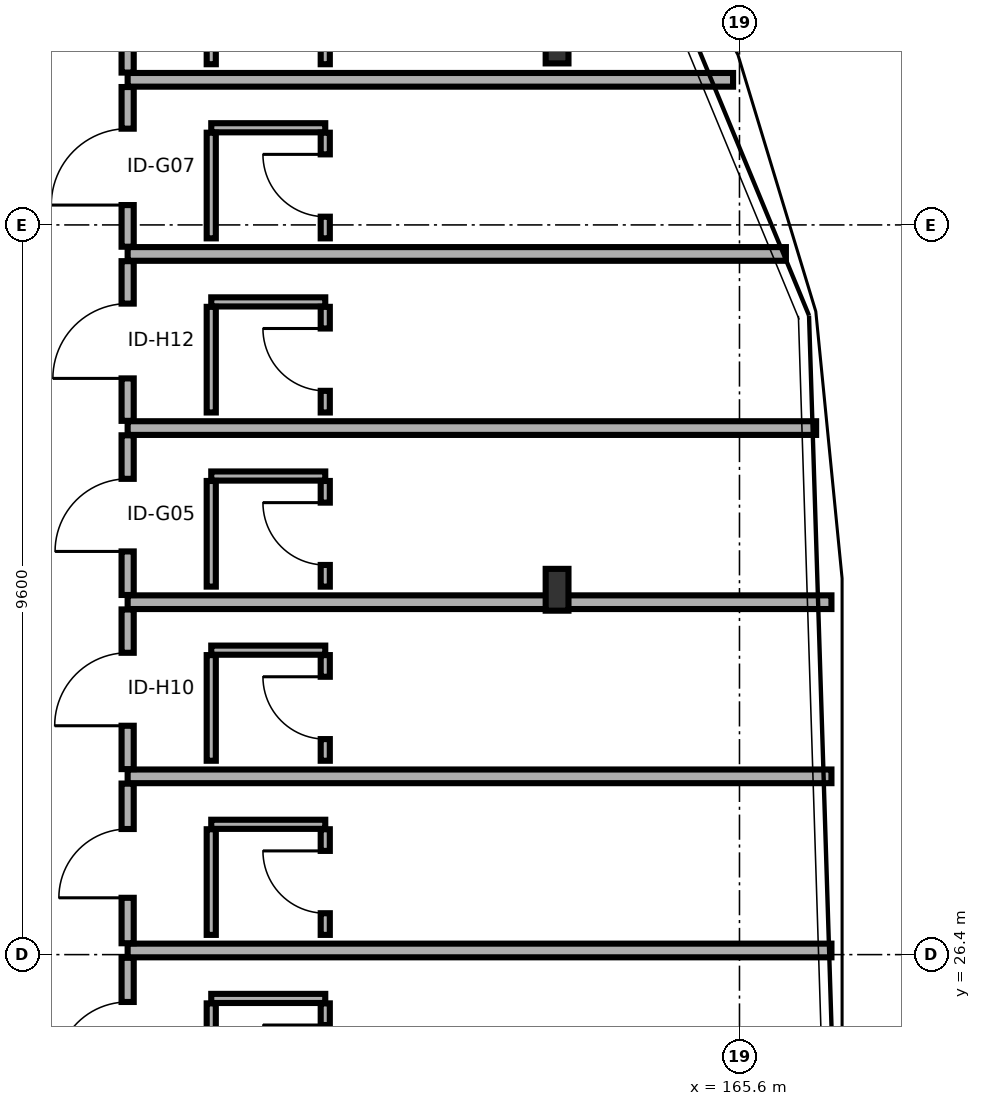
"""IFC4 building model, lengths in metres.
Left out: names, types, materials, properties, quantities, classifications, styles, units other than length and angle.
Written with IfcOpenShell. Run it as: python <this file> out.ifc"""

import sys

from ifc_helpers import new_model, si_unit, direction, frame, frame_2d, origin, origin_2d, place, context, subcontext, project, spatial, rectangle, i_section, extrude, element, fill, save


model = new_model("IFC4")
c1 = context("Model", 3, precision=1e-05, world=origin(), true_north=direction((0.0, 1.0)))
c2 = subcontext(c1, "Body", "Model", "MODEL_VIEW")
j1 = project(units=[si_unit("LENGTHUNIT", "METRE"), si_unit("PLANEANGLEUNIT", "RADIAN")], contexts=[c1])
p1 = place(None, origin())
s1 = spatial("IfcSite", under=j1, at=p1, CompositionType="ELEMENT")
p2 = place(p1, origin())
s2 = spatial("IfcBuilding", under=s1, at=p2, CompositionType="ELEMENT")
p3 = place(p2, frame((0.0, 0.0, 21.5)))
s3 = spatial("IfcBuildingStorey", under=s2, at=p3, CompositionType="ELEMENT", Elevation=21.5)
for number, where, z_axis, x_axis in (
    (1, (163.2, 31.2, 0.0), (0.0, 0.0, 1.0), (1.0, 0.0, 0.0)),
    (2, (163.2, 38.4, 0.0), (0.0, 0.0, 1.0), (1.0, 0.0, 0.0)),
):
    element("IfcColumn", number, at=place(p3, frame(where, z_axis=z_axis, x_axis=x_axis)), inside=s3, PredefinedType="COLUMN", context=c2, shape_type="SweptSolid", body=[
        extrude(i_section(OverallWidth=0.3, OverallDepth=0.55, WebThickness=0.015, FlangeThickness=0.029, FilletRadius=0.027, at=origin_2d()), origin(), (0.0, 0.0, 1.0), 3.4),
    ])
p4 = place(p3, frame((157.55, 24.259, 0.0), z_axis=(0.0, 0.0, 1.0), x_axis=(0.0, 1.0, 0.0)))
e3 = element("IfcWall", 3, at=p4, inside=s3, PredefinedType="PARTITIONING", context=c2, shape_type="SweptSolid", body=[
    extrude(rectangle(XDim=2.101, YDim=0.16, at=frame_2d((1.051, 0.0))), origin(), (0.0, 0.0, 1.0), 3.195),
])
p5 = place(p4, frame((0.583, 0.0, 0.0)))
e4 = element("IfcOpeningElement", 4, at=p5, cuts=e3, PredefinedType="OPENING", context=c2, shape_type="SweptSolid", body=[
    extrude(rectangle(XDim=0.936, YDim=2.07, at=frame_2d((0.468, 1.035))), frame((0.0, 0.09, 0.0), z_axis=(0.0, -1.0, 0.0), x_axis=(1.0, 0.0, 0.0)), (0.0, 0.0, 1.0), 0.18),
])
p6 = place(p3, frame((158.65, 25.823, 0.0), z_axis=(0.0, 0.0, 1.0), x_axis=(1.0, 0.0, 0.0)))
e5 = element("IfcWall", 5, at=p6, inside=s3, PredefinedType="PARTITIONING", context=c2, shape_type="SweptSolid", body=[
    extrude(rectangle(XDim=1.5, YDim=0.12, at=frame_2d((0.75, 0.0))), origin(), (0.0, 0.0, 1.0), 3.195),
])
p7 = place(p3, frame((158.65, 24.369, 0.0), z_axis=(0.0, 0.0, 1.0), x_axis=(0.0, 1.0, 0.0)))
e6 = element("IfcWall", 6, at=p7, inside=s3, PredefinedType="PARTITIONING", context=c2, shape_type="SweptSolid", body=[
    extrude(rectangle(XDim=1.39, YDim=0.12, at=frame_2d((0.695, 0.0))), origin(), (0.0, 0.0, 1.0), 3.195),
])
p8 = place(p3, frame((160.15, 24.369, 0.0), z_axis=(0.0, 0.0, 1.0), x_axis=(0.0, 1.0, 0.0)))
e7 = element("IfcWall", 7, at=p8, inside=s3, PredefinedType="PARTITIONING", context=c2, shape_type="SweptSolid", body=[
    extrude(rectangle(XDim=1.39, YDim=0.12, at=frame_2d((0.695, 0.0))), origin(), (0.0, 0.0, 1.0), 3.195),
])
p9 = place(p8, frame((0.285, 0.0, 0.0)))
e8 = element("IfcOpeningElement", 8, at=p9, cuts=e7, PredefinedType="OPENING", context=c2, shape_type="SweptSolid", body=[
    extrude(rectangle(XDim=0.82, YDim=2.08, at=frame_2d((0.41, 1.04))), frame((0.0, 0.07, 0.0), z_axis=(0.0, -1.0, 0.0), x_axis=(1.0, 0.0, 0.0)), (0.0, 0.0, 1.0), 0.14),
])
p10 = place(p3, frame((157.55, 26.455, 0.0), z_axis=(0.0, 0.0, 1.0), x_axis=(1.0, 0.0, 0.0)))
e9 = element("IfcWall", 9, at=p10, inside=s3, PredefinedType="PARTITIONING", context=c2, shape_type="SweptSolid", body=[
    extrude(rectangle(XDim=9.26, YDim=0.18, at=frame_2d((4.63, 0.0))), origin(), (0.0, 0.0, 1.0), 2.68),
])
p11 = place(p3, frame((157.55, 26.55, 0.0), z_axis=(0.0, 0.0, 1.0), x_axis=(0.0, 1.0, 0.0)))
e10 = element("IfcWall", 10, at=p11, inside=s3, PredefinedType="PARTITIONING", context=c2, shape_type="SweptSolid", body=[
    extrude(rectangle(XDim=2.101, YDim=0.16, at=frame_2d((1.05, 0.0))), origin(), (0.0, 0.0, 1.0), 3.195),
])
p12 = place(p11, frame((0.598, 0.0, 0.0)))
e11 = element("IfcOpeningElement", 11, at=p12, cuts=e10, PredefinedType="OPENING", context=c2, shape_type="SweptSolid", body=[
    extrude(rectangle(XDim=0.905, YDim=2.05, at=frame_2d((0.453, 1.025))), frame((0.0, 0.09, 0.0), z_axis=(0.0, -1.0, 0.0), x_axis=(1.0, 0.0, 0.0)), (0.0, 0.0, 1.0), 0.18),
])
p13 = place(p3, frame((158.65, 28.115, 0.0), z_axis=(0.0, 0.0, 1.0), x_axis=(1.0, 0.0, 0.0)))
e12 = element("IfcWall", 12, at=p13, inside=s3, PredefinedType="PARTITIONING", context=c2, shape_type="SweptSolid", body=[
    extrude(rectangle(XDim=1.5, YDim=0.12, at=frame_2d((0.75, 0.0))), origin(), (0.0, 0.0, 1.0), 3.195),
])
p14 = place(p3, frame((158.65, 26.659, 0.0), z_axis=(0.0, 0.0, 1.0), x_axis=(0.0, 1.0, 0.0)))
e13 = element("IfcWall", 13, at=p14, inside=s3, PredefinedType="PARTITIONING", context=c2, shape_type="SweptSolid", body=[
    extrude(rectangle(XDim=1.39, YDim=0.12, at=frame_2d((0.695, 0.0))), origin(), (0.0, 0.0, 1.0), 3.195),
])
p15 = place(p3, frame((160.15, 26.659, 0.0), z_axis=(0.0, 0.0, 1.0), x_axis=(0.0, 1.0, 0.0)))
e14 = element("IfcWall", 14, at=p15, inside=s3, PredefinedType="PARTITIONING", context=c2, shape_type="SweptSolid", body=[
    extrude(rectangle(XDim=1.39, YDim=0.12, at=frame_2d((0.695, 0.0))), origin(), (0.0, 0.0, 1.0), 3.195),
])
p16 = place(p15, frame((0.285, 0.0, 0.0)))
e15 = element("IfcOpeningElement", 15, at=p16, cuts=e14, PredefinedType="OPENING", context=c2, shape_type="SweptSolid", body=[
    extrude(rectangle(XDim=0.82, YDim=2.08, at=frame_2d((0.41, 1.04))), frame((0.0, 0.07, 0.0), z_axis=(0.0, -1.0, 0.0), x_axis=(1.0, 0.0, 0.0)), (0.0, 0.0, 1.0), 0.14),
])
p17 = place(p3, frame((157.55, 28.746, 0.0), z_axis=(0.0, 0.0, 1.0), x_axis=(1.0, 0.0, 0.0)))
e16 = element("IfcWall", 16, at=p17, inside=s3, PredefinedType="PARTITIONING", context=c2, shape_type="SweptSolid", body=[
    extrude(rectangle(XDim=9.26, YDim=0.18, at=frame_2d((4.63, 0.0))), origin(), (0.0, 0.0, 1.0), 2.68),
])
p18 = place(p3, frame((157.55, 28.841, 0.0), z_axis=(0.0, 0.0, 1.0), x_axis=(0.0, 1.0, 0.0)))
e17 = element("IfcWall", 17, at=p18, inside=s3, PredefinedType="PARTITIONING", context=c2, shape_type="SweptSolid", body=[
    extrude(rectangle(XDim=2.101, YDim=0.16, at=frame_2d((1.05, 0.0))), origin(), (0.0, 0.0, 1.0), 3.195),
])
p19 = place(p18, frame((0.571, 0.0, 0.0)))
e18 = element("IfcOpeningElement", 18, at=p19, cuts=e17, PredefinedType="OPENING", context=c2, shape_type="SweptSolid", body=[
    extrude(rectangle(XDim=0.96, YDim=2.13, at=frame_2d((0.48, 1.065))), frame((0.0, 0.09, 0.0), z_axis=(0.0, -1.0, 0.0), x_axis=(1.0, 0.0, 0.0)), (0.0, 0.0, 1.0), 0.18),
])
p20 = place(p3, frame((158.65, 30.406, 0.0), z_axis=(0.0, 0.0, 1.0), x_axis=(1.0, 0.0, 0.0)))
e19 = element("IfcWall", 19, at=p20, inside=s3, PredefinedType="PARTITIONING", context=c2, shape_type="SweptSolid", body=[
    extrude(rectangle(XDim=1.5, YDim=0.12, at=frame_2d((0.75, 0.0))), origin(), (0.0, 0.0, 1.0), 3.195),
])
p21 = place(p3, frame((158.65, 28.95, 0.0), z_axis=(0.0, 0.0, 1.0), x_axis=(0.0, 1.0, 0.0)))
e20 = element("IfcWall", 20, at=p21, inside=s3, PredefinedType="PARTITIONING", context=c2, shape_type="SweptSolid", body=[
    extrude(rectangle(XDim=1.39, YDim=0.12, at=frame_2d((0.695, 0.0))), origin(), (0.0, 0.0, 1.0), 3.195),
])
p22 = place(p3, frame((160.15, 28.95, 0.0), z_axis=(0.0, 0.0, 1.0), x_axis=(0.0, 1.0, 0.0)))
e21 = element("IfcWall", 21, at=p22, inside=s3, PredefinedType="PARTITIONING", context=c2, shape_type="SweptSolid", body=[
    extrude(rectangle(XDim=1.39, YDim=0.12, at=frame_2d((0.695, 0.0))), origin(), (0.0, 0.0, 1.0), 3.195),
])
p23 = place(p22, frame((0.285, 0.0, 0.0)))
e22 = element("IfcOpeningElement", 22, at=p23, cuts=e21, PredefinedType="OPENING", context=c2, shape_type="SweptSolid", body=[
    extrude(rectangle(XDim=0.82, YDim=2.08, at=frame_2d((0.41, 1.04))), frame((0.0, 0.07, 0.0), z_axis=(0.0, -1.0, 0.0), x_axis=(1.0, 0.0, 0.0)), (0.0, 0.0, 1.0), 0.14),
])
p24 = place(p3, frame((157.55, 31.036, 0.0), z_axis=(0.0, 0.0, 1.0), x_axis=(1.0, 0.0, 0.0)))
e23 = element("IfcWall", 23, at=p24, inside=s3, PredefinedType="PARTITIONING", context=c2, shape_type="SweptSolid", body=[
    extrude(rectangle(XDim=9.26, YDim=0.18, at=frame_2d((4.63, 0.0))), origin(), (0.0, 0.0, 1.0), 2.68),
])
p25 = place(p3, frame((157.55, 31.131, 0.0), z_axis=(0.0, 0.0, 1.0), x_axis=(0.0, 1.0, 0.0)))
e24 = element("IfcWall", 24, at=p25, inside=s3, PredefinedType="PARTITIONING", context=c2, shape_type="SweptSolid", body=[
    extrude(rectangle(XDim=2.101, YDim=0.16, at=frame_2d((1.051, 0.0))), origin(), (0.0, 0.0, 1.0), 2.73),
])
p26 = place(p25, frame((0.573, 0.0, 0.0)))
e25 = element("IfcOpeningElement", 25, at=p26, cuts=e24, PredefinedType="OPENING", context=c2, shape_type="SweptSolid", body=[
    extrude(rectangle(XDim=0.955, YDim=2.05, at=frame_2d((0.478, 1.025))), frame((0.0, 0.09, 0.0), z_axis=(0.0, -1.0, 0.0), x_axis=(1.0, 0.0, 0.0)), (0.0, 0.0, 1.0), 0.18),
])
p27 = place(p3, frame((158.65, 32.696, 0.0), z_axis=(0.0, 0.0, 1.0), x_axis=(1.0, 0.0, 0.0)))
e26 = element("IfcWall", 26, at=p27, inside=s3, PredefinedType="PARTITIONING", context=c2, shape_type="SweptSolid", body=[
    extrude(rectangle(XDim=1.5, YDim=0.12, at=frame_2d((0.75, 0.0))), origin(), (0.0, 0.0, 1.0), 3.195),
])
p28 = place(p3, frame((158.65, 31.241, 0.0), z_axis=(0.0, 0.0, 1.0), x_axis=(0.0, 1.0, 0.0)))
e27 = element("IfcWall", 27, at=p28, inside=s3, PredefinedType="PARTITIONING", context=c2, shape_type="SweptSolid", body=[
    extrude(rectangle(XDim=1.39, YDim=0.12, at=frame_2d((0.695, 0.0))), origin(), (0.0, 0.0, 1.0), 2.73),
])
p29 = place(p3, frame((160.15, 31.241, 0.0), z_axis=(0.0, 0.0, 1.0), x_axis=(0.0, 1.0, 0.0)))
e28 = element("IfcWall", 28, at=p29, inside=s3, PredefinedType="PARTITIONING", context=c2, shape_type="SweptSolid", body=[
    extrude(rectangle(XDim=1.39, YDim=0.12, at=frame_2d((0.695, 0.0))), origin(), (0.0, 0.0, 1.0), 2.73),
])
p30 = place(p29, frame((0.285, 0.0, 0.0)))
e29 = element("IfcOpeningElement", 29, at=p30, cuts=e28, PredefinedType="OPENING", context=c2, shape_type="SweptSolid", body=[
    extrude(rectangle(XDim=0.82, YDim=2.08, at=frame_2d((0.41, 1.04))), frame((0.0, 0.07, 0.0), z_axis=(0.0, -1.0, 0.0), x_axis=(1.0, 0.0, 0.0)), (0.0, 0.0, 1.0), 0.14),
])
p31 = place(p3, frame((157.55, 33.327, 0.0), z_axis=(0.0, 0.0, 1.0), x_axis=(1.0, 0.0, 0.0)))
e30 = element("IfcWall", 30, at=p31, inside=s3, PredefinedType="PARTITIONING", context=c2, shape_type="SweptSolid", body=[
    extrude(rectangle(XDim=9.058, YDim=0.18, at=frame_2d((4.529, 0.0))), origin(), (0.0, 0.0, 1.0), 2.68),
])
p32 = place(p3, frame((157.55, 33.422, 0.0), z_axis=(0.0, 0.0, 1.0), x_axis=(0.0, 1.0, 0.0)))
e31 = element("IfcWall", 31, at=p32, inside=s3, PredefinedType="PARTITIONING", context=c2, shape_type="SweptSolid", body=[
    extrude(rectangle(XDim=2.101, YDim=0.16, at=frame_2d((1.05, 0.0))), origin(), (0.0, 0.0, 1.0), 3.195),
])
p33 = place(p32, frame((0.559, 0.0, 0.0)))
e32 = element("IfcOpeningElement", 32, at=p33, cuts=e31, PredefinedType="OPENING", context=c2, shape_type="SweptSolid", body=[
    extrude(rectangle(XDim=0.984, YDim=2.07, at=frame_2d((0.492, 1.035))), frame((0.0, 0.09, 0.0), z_axis=(0.0, -1.0, 0.0), x_axis=(1.0, 0.0, 0.0)), (0.0, 0.0, 1.0), 0.18),
])
p34 = place(p3, frame((158.65, 34.987, 0.0), z_axis=(0.0, 0.0, 1.0), x_axis=(1.0, 0.0, 0.0)))
e33 = element("IfcWall", 33, at=p34, inside=s3, PredefinedType="PARTITIONING", context=c2, shape_type="SweptSolid", body=[
    extrude(rectangle(XDim=1.5, YDim=0.12, at=frame_2d((0.75, 0.0))), origin(), (0.0, 0.0, 1.0), 3.195),
])
p35 = place(p3, frame((158.65, 33.532, 0.0), z_axis=(0.0, 0.0, 1.0), x_axis=(0.0, 1.0, 0.0)))
e34 = element("IfcWall", 34, at=p35, inside=s3, PredefinedType="PARTITIONING", context=c2, shape_type="SweptSolid", body=[
    extrude(rectangle(XDim=1.39, YDim=0.12, at=frame_2d((0.695, 0.0))), origin(), (0.0, 0.0, 1.0), 3.195),
])
p36 = place(p3, frame((160.15, 33.532, 0.0), z_axis=(0.0, 0.0, 1.0), x_axis=(0.0, 1.0, 0.0)))
e35 = element("IfcWall", 35, at=p36, inside=s3, PredefinedType="PARTITIONING", context=c2, shape_type="SweptSolid", body=[
    extrude(rectangle(XDim=1.39, YDim=0.12, at=frame_2d((0.695, 0.0))), origin(), (0.0, 0.0, 1.0), 3.195),
])
p37 = place(p36, frame((0.285, 0.0, 0.0)))
e36 = element("IfcOpeningElement", 36, at=p37, cuts=e35, PredefinedType="OPENING", context=c2, shape_type="SweptSolid", body=[
    extrude(rectangle(XDim=0.82, YDim=2.08, at=frame_2d((0.41, 1.04))), frame((0.0, 0.07, 0.0), z_axis=(0.0, -1.0, 0.0), x_axis=(1.0, 0.0, 0.0)), (0.0, 0.0, 1.0), 0.14),
])
p38 = place(p3, frame((157.55, 35.618, 0.0), z_axis=(0.0, 0.0, 1.0), x_axis=(1.0, 0.0, 0.0)))
e37 = element("IfcWall", 37, at=p38, inside=s3, PredefinedType="PARTITIONING", context=c2, shape_type="SweptSolid", body=[
    extrude(rectangle(XDim=8.661, YDim=0.18, at=frame_2d((4.33, 0.0))), origin(), (0.0, 0.0, 1.0), 2.68),
])
p39 = place(p3, frame((157.55, 35.713, 0.0), z_axis=(0.0, 0.0, 1.0), x_axis=(0.0, 1.0, 0.0)))
e38 = element("IfcWall", 38, at=p39, inside=s3, PredefinedType="PARTITIONING", context=c2, shape_type="SweptSolid", body=[
    extrude(rectangle(XDim=2.101, YDim=0.16, at=frame_2d((1.051, 0.0))), origin(), (0.0, 0.0, 1.0), 3.195),
])
p40 = place(p39, frame((0.548, 0.0, 0.0)))
e39 = element("IfcOpeningElement", 39, at=p40, cuts=e38, PredefinedType="OPENING", context=c2, shape_type="SweptSolid", body=[
    extrude(rectangle(XDim=1.005, YDim=2.05, at=frame_2d((0.502, 1.025))), frame((0.0, 0.09, 0.0), z_axis=(0.0, -1.0, 0.0), x_axis=(1.0, 0.0, 0.0)), (0.0, 0.0, 1.0), 0.18),
])
p41 = place(p3, frame((158.65, 37.278, 0.0), z_axis=(0.0, 0.0, 1.0), x_axis=(1.0, 0.0, 0.0)))
e40 = element("IfcWall", 40, at=p41, inside=s3, PredefinedType="PARTITIONING", context=c2, shape_type="SweptSolid", body=[
    extrude(rectangle(XDim=1.5, YDim=0.12, at=frame_2d((0.75, 0.0))), origin(), (0.0, 0.0, 1.0), 3.195),
])
p42 = place(p3, frame((158.65, 35.823, 0.0), z_axis=(0.0, 0.0, 1.0), x_axis=(0.0, 1.0, 0.0)))
e41 = element("IfcWall", 41, at=p42, inside=s3, PredefinedType="PARTITIONING", context=c2, shape_type="SweptSolid", body=[
    extrude(rectangle(XDim=1.39, YDim=0.12, at=frame_2d((0.695, 0.0))), origin(), (0.0, 0.0, 1.0), 3.195),
])
p43 = place(p3, frame((160.15, 35.823, 0.0), z_axis=(0.0, 0.0, 1.0), x_axis=(0.0, 1.0, 0.0)))
e42 = element("IfcWall", 42, at=p43, inside=s3, PredefinedType="PARTITIONING", context=c2, shape_type="SweptSolid", body=[
    extrude(rectangle(XDim=1.39, YDim=0.12, at=frame_2d((0.695, 0.0))), origin(), (0.0, 0.0, 1.0), 3.195),
])
p44 = place(p43, frame((0.285, 0.0, 0.0)))
e43 = element("IfcOpeningElement", 43, at=p44, cuts=e42, PredefinedType="OPENING", context=c2, shape_type="SweptSolid", body=[
    extrude(rectangle(XDim=0.82, YDim=2.08, at=frame_2d((0.41, 1.04))), frame((0.0, 0.07, 0.0), z_axis=(0.0, -1.0, 0.0), x_axis=(1.0, 0.0, 0.0)), (0.0, 0.0, 1.0), 0.14),
])
p45 = place(p3, frame((157.55, 37.909, 0.0), z_axis=(0.0, 0.0, 1.0), x_axis=(1.0, 0.0, 0.0)))
e44 = element("IfcWall", 44, at=p45, inside=s3, PredefinedType="PARTITIONING", context=c2, shape_type="SweptSolid", body=[
    extrude(rectangle(XDim=7.966, YDim=0.18, at=frame_2d((3.983, 0.0))), origin(), (0.0, 0.0, 1.0), 2.68),
])
p46 = place(p3, frame((157.55, 38.004, 0.0), z_axis=(0.0, 0.0, 1.0), x_axis=(0.0, 1.0, 0.0)))
e45 = element("IfcWall", 45, at=p46, inside=s3, PredefinedType="PARTITIONING", context=c2, shape_type="SweptSolid", body=[
    extrude(rectangle(XDim=2.101, YDim=0.16, at=frame_2d((1.05, 0.0))), origin(), (0.0, 0.0, 1.0), 2.73),
])
p47 = place(p46, frame((0.546, 0.0, 0.0)))
e46 = element("IfcOpeningElement", 46, at=p47, cuts=e45, PredefinedType="OPENING", context=c2, shape_type="SweptSolid", body=[
    extrude(rectangle(XDim=1.008, YDim=2.13, at=frame_2d((0.504, 1.065))), frame((0.0, 0.09, 0.0), z_axis=(0.0, -1.0, 0.0), x_axis=(1.0, 0.0, 0.0)), (0.0, 0.0, 1.0), 0.18),
])
p48 = place(p3, frame((158.65, 38.114, 0.0), z_axis=(0.0, 0.0, 1.0), x_axis=(0.0, 1.0, 0.0)))
e47 = element("IfcWall", 47, at=p48, inside=s3, PredefinedType="PARTITIONING", context=c2, shape_type="SweptSolid", body=[
    extrude(rectangle(XDim=1.39, YDim=0.12, at=frame_2d((0.695, 0.0))), origin(), (0.0, 0.0, 1.0), 2.73),
])
p49 = place(p3, frame((160.15, 38.114, 0.0), z_axis=(0.0, 0.0, 1.0), x_axis=(0.0, 1.0, 0.0)))
e48 = element("IfcWall", 48, at=p49, inside=s3, PredefinedType="PARTITIONING", context=c2, shape_type="SweptSolid", body=[
    extrude(rectangle(XDim=1.39, YDim=0.12, at=frame_2d((0.695, 0.0))), origin(), (0.0, 0.0, 1.0), 2.73),
])
p50 = place(p49, frame((0.285, 0.0, 0.0)))
e49 = element("IfcOpeningElement", 49, at=p50, cuts=e48, PredefinedType="OPENING", context=c2, shape_type="SweptSolid", body=[
    extrude(rectangle(XDim=0.82, YDim=2.08, at=frame_2d((0.41, 1.04))), frame((0.0, 0.07, 0.0), z_axis=(0.0, -1.0, 0.0), x_axis=(1.0, 0.0, 0.0)), (0.0, 0.0, 1.0), 0.14),
])
p51 = place(p5, origin())
e50 = element("IfcDoor", 50, at=p51, inside=s3, OperationType="SINGLE_SWING_LEFT", PredefinedType="DOOR", context=c2, shape_type="SweptSolid", body=[
    extrude(rectangle(XDim=0.936, YDim=2.07, at=frame_2d((0.468, 1.035))), frame((0.0, 0.025, 0.0), z_axis=(0.0, -1.0, 0.0), x_axis=(1.0, 0.0, 0.0)), (0.0, 0.0, 1.0), 0.05),
])
fill(e4, e50)
p52 = place(p9, origin())
e51 = element("IfcDoor", 51, at=p52, inside=s3, OperationType="SINGLE_SWING_RIGHT", PredefinedType="DOOR", context=c2, shape_type="SweptSolid", body=[
    extrude(rectangle(XDim=0.82, YDim=2.08, at=frame_2d((0.41, 1.04))), frame((0.0, 0.025, 0.0), z_axis=(0.0, -1.0, 0.0), x_axis=(1.0, 0.0, 0.0)), (0.0, 0.0, 1.0), 0.05),
])
fill(e8, e51)
p53 = place(p12, origin())
e52 = element("IfcDoor", 52, at=p53, inside=s3, OperationType="SINGLE_SWING_LEFT", PredefinedType="DOOR", context=c2, shape_type="SweptSolid", body=[
    extrude(rectangle(XDim=0.905, YDim=2.05, at=frame_2d((0.453, 1.025))), frame((0.0, 0.025, 0.0), z_axis=(0.0, -1.0, 0.0), x_axis=(1.0, 0.0, 0.0)), (0.0, 0.0, 1.0), 0.05),
])
fill(e11, e52)
p54 = place(p16, origin())
e53 = element("IfcDoor", 53, at=p54, inside=s3, OperationType="SINGLE_SWING_RIGHT", PredefinedType="DOOR", context=c2, shape_type="SweptSolid", body=[
    extrude(rectangle(XDim=0.82, YDim=2.08, at=frame_2d((0.41, 1.04))), frame((0.0, 0.025, 0.0), z_axis=(0.0, -1.0, 0.0), x_axis=(1.0, 0.0, 0.0)), (0.0, 0.0, 1.0), 0.05),
])
fill(e15, e53)
p55 = place(p19, origin())
e54 = element("IfcDoor", 54, at=p55, inside=s3, OperationType="SINGLE_SWING_LEFT", PredefinedType="DOOR", context=c2, shape_type="SweptSolid", body=[
    extrude(rectangle(XDim=0.96, YDim=2.13, at=frame_2d((0.48, 1.065))), frame((0.0, 0.025, 0.0), z_axis=(0.0, -1.0, 0.0), x_axis=(1.0, 0.0, 0.0)), (0.0, 0.0, 1.0), 0.05),
])
fill(e18, e54)
p56 = place(p23, origin())
e55 = element("IfcDoor", 55, at=p56, inside=s3, OperationType="SINGLE_SWING_RIGHT", PredefinedType="DOOR", context=c2, shape_type="SweptSolid", body=[
    extrude(rectangle(XDim=0.82, YDim=2.08, at=frame_2d((0.41, 1.04))), frame((0.0, 0.025, 0.0), z_axis=(0.0, -1.0, 0.0), x_axis=(1.0, 0.0, 0.0)), (0.0, 0.0, 1.0), 0.05),
])
fill(e22, e55)
p57 = place(p26, origin())
e56 = element("IfcDoor", 56, at=p57, inside=s3, OperationType="SINGLE_SWING_LEFT", PredefinedType="DOOR", context=c2, shape_type="SweptSolid", body=[
    extrude(rectangle(XDim=0.955, YDim=2.05, at=frame_2d((0.478, 1.025))), frame((0.0, 0.025, 0.0), z_axis=(0.0, -1.0, 0.0), x_axis=(1.0, 0.0, 0.0)), (0.0, 0.0, 1.0), 0.05),
])
fill(e25, e56)
p58 = place(p30, origin())
e57 = element("IfcDoor", 57, at=p58, inside=s3, OperationType="SINGLE_SWING_RIGHT", PredefinedType="DOOR", context=c2, shape_type="SweptSolid", body=[
    extrude(rectangle(XDim=0.82, YDim=2.08, at=frame_2d((0.41, 1.04))), frame((0.0, 0.025, 0.0), z_axis=(0.0, -1.0, 0.0), x_axis=(1.0, 0.0, 0.0)), (0.0, 0.0, 1.0), 0.05),
])
fill(e29, e57)
p59 = place(p33, origin())
e58 = element("IfcDoor", 58, at=p59, inside=s3, OperationType="SINGLE_SWING_LEFT", PredefinedType="DOOR", context=c2, shape_type="SweptSolid", body=[
    extrude(rectangle(XDim=0.984, YDim=2.07, at=frame_2d((0.492, 1.035))), frame((0.0, 0.025, 0.0), z_axis=(0.0, -1.0, 0.0), x_axis=(1.0, 0.0, 0.0)), (0.0, 0.0, 1.0), 0.05),
])
fill(e32, e58)
p60 = place(p37, origin())
e59 = element("IfcDoor", 59, at=p60, inside=s3, OperationType="SINGLE_SWING_RIGHT", PredefinedType="DOOR", context=c2, shape_type="SweptSolid", body=[
    extrude(rectangle(XDim=0.82, YDim=2.08, at=frame_2d((0.41, 1.04))), frame((0.0, 0.025, 0.0), z_axis=(0.0, -1.0, 0.0), x_axis=(1.0, 0.0, 0.0)), (0.0, 0.0, 1.0), 0.05),
])
fill(e36, e59)
p61 = place(p40, origin())
e60 = element("IfcDoor", 60, at=p61, inside=s3, OperationType="SINGLE_SWING_LEFT", PredefinedType="DOOR", context=c2, shape_type="SweptSolid", body=[
    extrude(rectangle(XDim=1.005, YDim=2.05, at=frame_2d((0.502, 1.025))), frame((0.0, 0.025, 0.0), z_axis=(0.0, -1.0, 0.0), x_axis=(1.0, 0.0, 0.0)), (0.0, 0.0, 1.0), 0.05),
])
fill(e39, e60)
p62 = place(p44, origin())
e61 = element("IfcDoor", 61, at=p62, inside=s3, OperationType="SINGLE_SWING_RIGHT", PredefinedType="DOOR", context=c2, shape_type="SweptSolid", body=[
    extrude(rectangle(XDim=0.82, YDim=2.08, at=frame_2d((0.41, 1.04))), frame((0.0, 0.025, 0.0), z_axis=(0.0, -1.0, 0.0), x_axis=(1.0, 0.0, 0.0)), (0.0, 0.0, 1.0), 0.05),
])
fill(e43, e61)
save(model, sys.argv[1])
